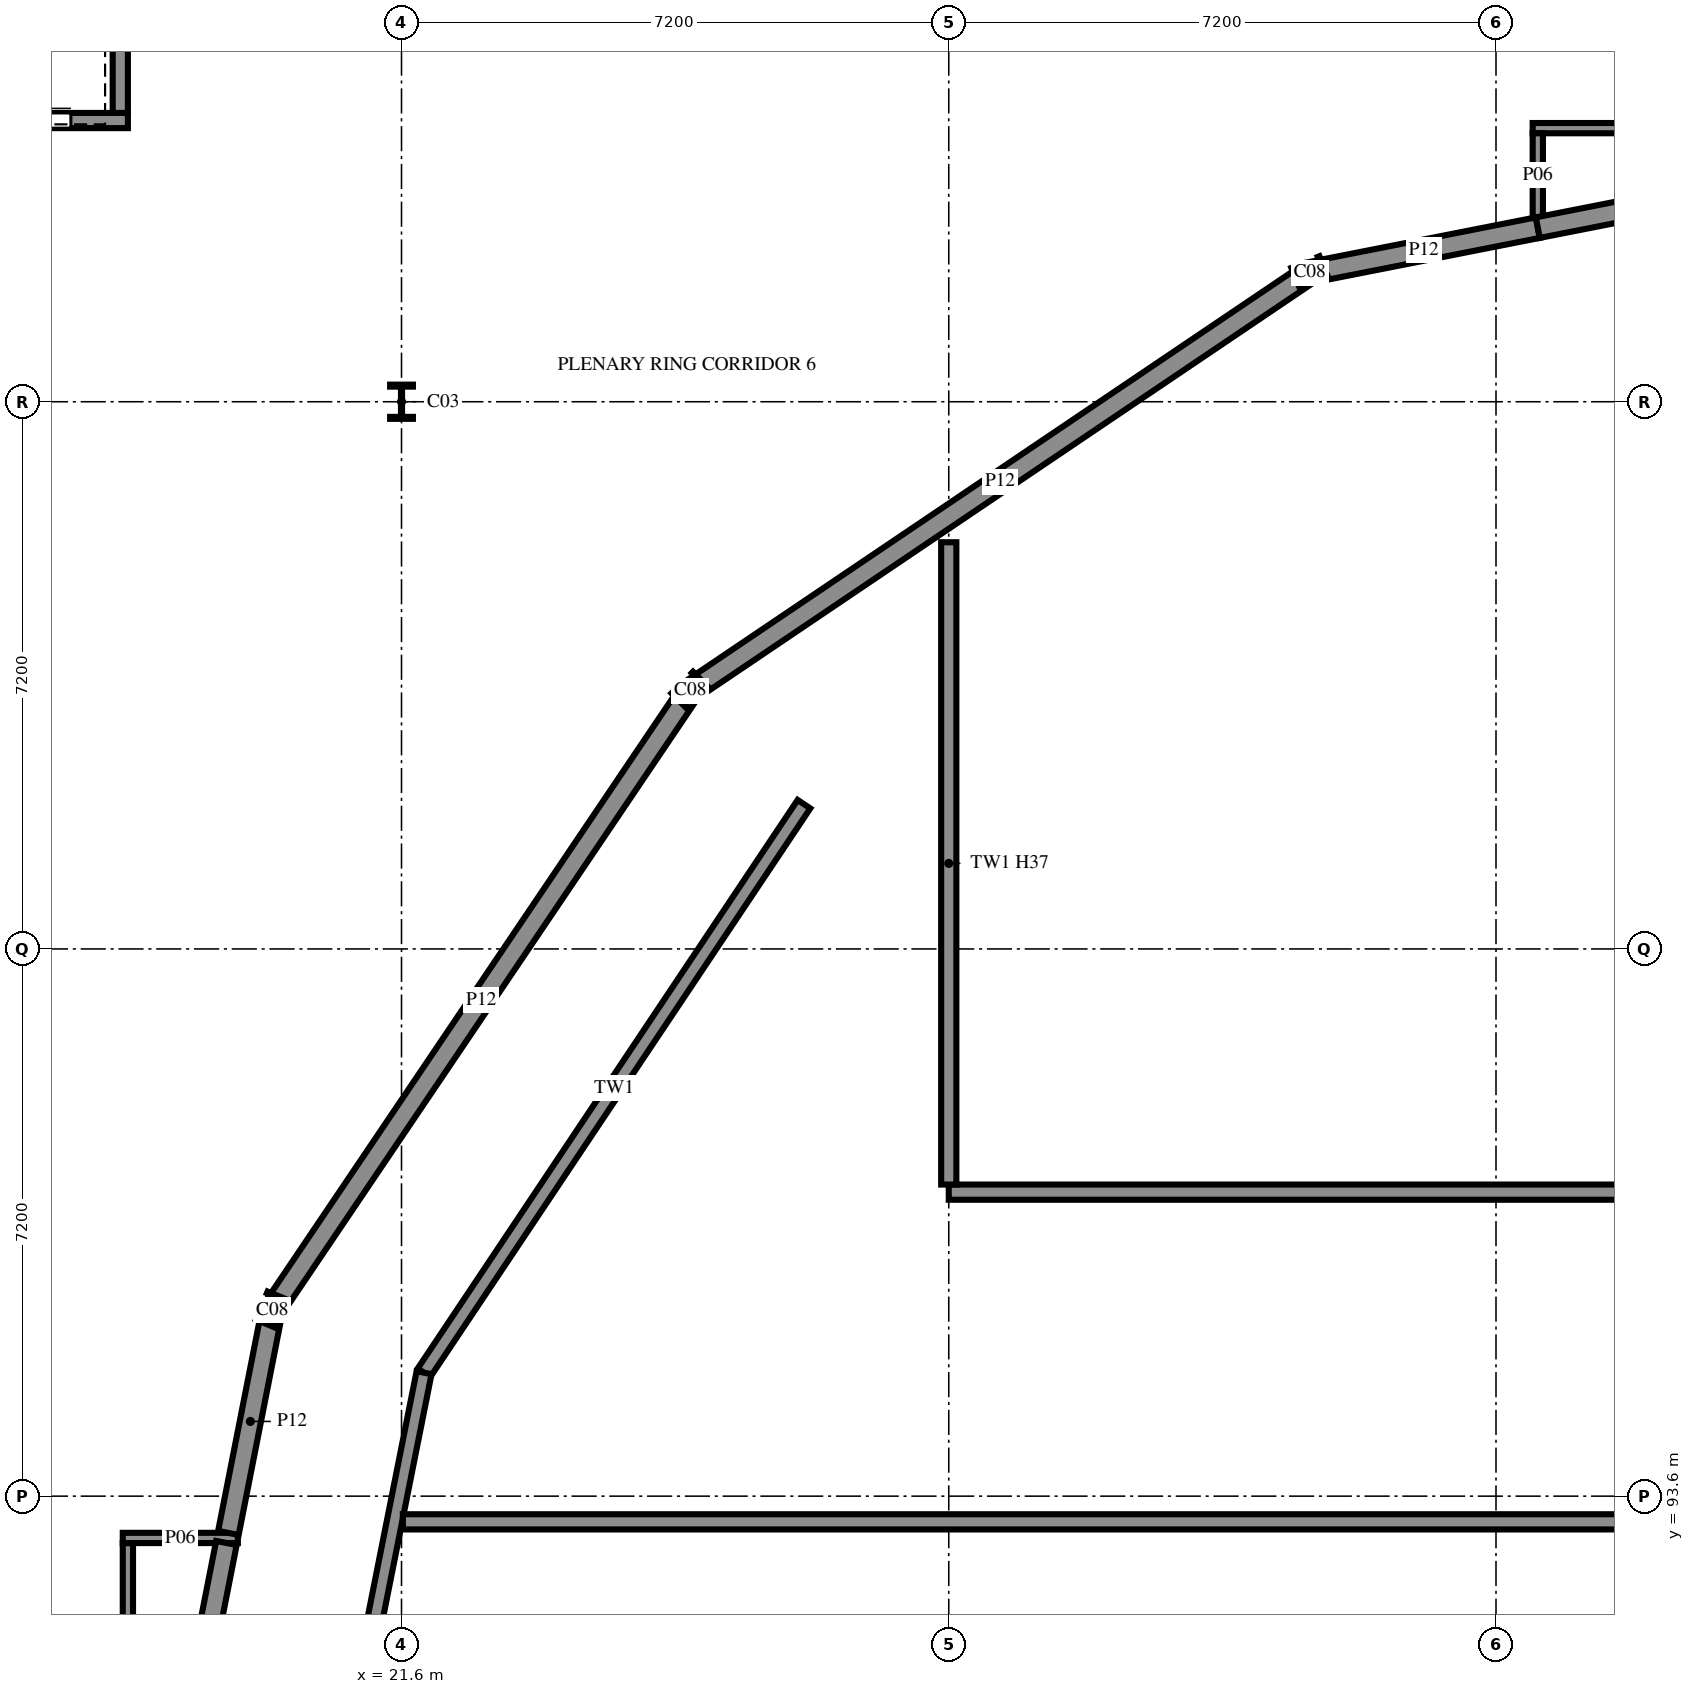
"""IFC4 building model, lengths in metres.
Left out: names, types, materials, properties, quantities, classifications, styles, units other than length and angle.
Written with IfcOpenShell. Run it as: python <this file> out.ifc"""

import sys

from ifc_helpers import new_model, si_unit, direction, frame, frame_2d, origin, origin_2d, place, context, subcontext, project, spatial, rectangle, i_section, extrude, element, fill, save


model = new_model("IFC4")
c1 = context("Model", 3, precision=1e-05, world=origin(), true_north=direction((0.0, 1.0)))
c2 = subcontext(c1, "Body", "Model", "MODEL_VIEW")
j1 = project(units=[si_unit("LENGTHUNIT", "METRE"), si_unit("PLANEANGLEUNIT", "RADIAN")], contexts=[c1])
p1 = place(None, origin())
s1 = spatial("IfcSite", under=j1, at=p1, CompositionType="ELEMENT")
p2 = place(p1, origin())
s2 = spatial("IfcBuilding", under=s1, at=p2, CompositionType="ELEMENT")
p3 = place(p2, frame((0.0, 0.0, 3.6)))
s3 = spatial("IfcBuildingStorey", under=s2, at=p3, CompositionType="ELEMENT", Elevation=3.6)
p4 = place(p3, frame((21.6, 108.0, 0.0), z_axis=(0.0, 0.0, 1.0), x_axis=(1.0, 0.0, 0.0)))
e1 = element("IfcColumn", 1, at=p4, inside=s3, PredefinedType="COLUMN", context=c2, shape_type="SweptSolid", body=[
    extrude(i_section(OverallWidth=0.3, OverallDepth=0.45, WebThickness=0.014, FlangeThickness=0.026, FilletRadius=0.027, at=origin_2d()), origin(), (0.0, 0.0, 1.0), 3.6),
])
for number, where, z_axis, x_axis in (
    (2, (33.55, 109.7, 0.0), (0.0, 0.0, 1.0), (-0.383, 0.924, 0.0)),
    (3, (25.4, 104.2, 0.0), (0.0, 0.0, 1.0), (-0.707, 0.707, 0.0)),
    (4, (19.9, 96.05, 0.0), (0.0, 0.0, 1.0), (-0.924, 0.383, 0.0)),
):
    element("IfcColumn", number, at=place(p3, frame(where, z_axis=z_axis, x_axis=x_axis)), inside=s3, PredefinedType="COLUMN", context=c2, shape_type="SweptSolid", body=[
        extrude(i_section(OverallWidth=0.3, OverallDepth=0.4, WebThickness=0.013, FlangeThickness=0.024, FilletRadius=0.027, at=origin_2d()), origin(), (0.0, 0.0, 1.0), 3.6),
    ])
p5 = place(p3, frame((15.4, 111.7, 0.0), z_axis=(0.0, 0.0, 1.0), x_axis=(1.0, 0.0, 0.0)))
e5 = element("IfcWall", 5, at=p5, inside=s3, PredefinedType="SHEAR", context=c2, shape_type="SweptSolid", body=[
    extrude(rectangle(XDim=2.6, YDim=0.2, at=frame_2d((1.3, 0.0))), origin(), (0.0, 0.0, 1.0), 3.6),
])
p6 = place(p5, frame((0.75, 0.0, 0.0)))
e6 = element("IfcOpeningElement", 6, at=p6, cuts=e5, PredefinedType="OPENING", context=c2, shape_type="SweptSolid", body=[
    extrude(rectangle(XDim=1.1, YDim=2.1, at=frame_2d((0.55, 1.05))), frame((0.0, 0.11, 0.0), z_axis=(0.0, -1.0, 0.0), x_axis=(1.0, 0.0, 0.0)), (0.0, 0.0, 1.0), 0.22),
])
p7 = place(p3, frame((17.9, 111.8, 0.0), z_axis=(0.0, 0.0, 1.0), x_axis=(0.0, 1.0, 0.0)))
e7 = element("IfcWall", 7, at=p7, inside=s3, PredefinedType="SHEAR", context=c2, shape_type="SweptSolid", body=[
    extrude(rectangle(XDim=2.2, YDim=0.2, at=frame_2d((1.1, 0.0))), origin(), (0.0, 0.0, 1.0), 3.6),
])
p8 = place(p3, frame((18.0, 92.982, 0.0), z_axis=(0.0, 0.0, 1.0), x_axis=(0.0, -1.0, 0.0)))
e8 = element("IfcWall", 8, at=p8, inside=s3, PredefinedType="PARTITIONING", context=c2, shape_type="SweptSolid", body=[
    extrude(rectangle(XDim=5.732, YDim=0.135, at=frame_2d((2.866, 0.0))), origin(), (0.0, 0.0, 1.0), 3.42),
])
p9 = place(p3, frame((42.35, 111.6, 0.0), z_axis=(0.0, 0.0, 1.0), x_axis=(-1.0, 0.0, 0.0)))
e9 = element("IfcWall", 9, at=p9, inside=s3, PredefinedType="PARTITIONING", context=c2, shape_type="SweptSolid", body=[
    extrude(rectangle(XDim=5.868, YDim=0.135, at=frame_2d((2.934, 0.0))), origin(), (0.0, 0.0, 1.0), 3.42),
])
p10 = place(p3, frame((36.55, 111.532, 0.0), z_axis=(0.0, 0.0, 1.0), x_axis=(0.0, -1.0, 0.0)))
e10 = element("IfcWall", 10, at=p10, inside=s3, PredefinedType="PARTITIONING", context=c2, shape_type="SweptSolid", body=[
    extrude(rectangle(XDim=1.104, YDim=0.135, at=frame_2d((0.552, 0.0))), origin(), (0.0, 0.0, 1.0), 3.42),
])
p11 = place(p3, frame((19.447, 93.05, 0.0), z_axis=(0.0, 0.0, 1.0), x_axis=(-1.0, 0.0, 0.0)))
e11 = element("IfcWall", 11, at=p11, inside=s3, PredefinedType="PARTITIONING", context=c2, shape_type="SweptSolid", body=[
    extrude(rectangle(XDim=1.514, YDim=0.135, at=frame_2d((0.757, 0.0))), origin(), (0.0, 0.0, 1.0), 3.42),
])
p12 = place(p3, frame((19.9, 96.05, 0.0), z_axis=(0.0, 0.0, 1.0), x_axis=(-0.193179069745, -0.98116351696, 0.0)))
e12 = element("IfcWall", 12, at=p12, inside=s3, PredefinedType="PARTITIONING", context=c2, shape_type="SweptSolid", body=[
    extrude(rectangle(XDim=2.99, YDim=0.275, at=frame_2d((1.495, 0.0))), origin(), (0.0, 0.0, 1.0), 3.07),
])
p13 = place(p3, frame((36.55, 110.291, 0.0), z_axis=(0.0, 0.0, 1.0), x_axis=(-0.981153778086, -0.19322852726, 0.0)))
e13 = element("IfcWall", 13, at=p13, inside=s3, PredefinedType="PARTITIONING", context=c2, shape_type="SweptSolid", body=[
    extrude(rectangle(XDim=3.058, YDim=0.275, at=frame_2d((1.529, 0.0))), origin(), (0.0, 0.0, 1.0), 3.07),
])
p14 = place(p3, frame((33.55, 109.7, 0.0), z_axis=(0.0, 0.0, 1.0), x_axis=(-0.828912285216, -0.559378604719, 0.0)))
e14 = element("IfcWall", 14, at=p14, inside=s3, PredefinedType="PARTITIONING", context=c2, shape_type="SweptSolid", body=[
    extrude(rectangle(XDim=9.832, YDim=0.275, at=frame_2d((4.916, 0.0))), origin(), (0.0, 0.0, 1.0), 3.07),
])
p15 = place(p3, frame((25.4, 104.2, 0.0), z_axis=(0.0, 0.0, 1.0), x_axis=(-0.559390118145, -0.828904515443, 0.0)))
e15 = element("IfcWall", 15, at=p15, inside=s3, PredefinedType="PARTITIONING", context=c2, shape_type="SweptSolid", body=[
    extrude(rectangle(XDim=9.832, YDim=0.275, at=frame_2d((4.916, 0.0))), origin(), (0.0, 0.0, 1.0), 3.07),
])
p16 = place(p3, frame((43.2, 111.6, 0.0), z_axis=(0.0, 0.0, 1.0), x_axis=(-0.981162344826, -0.193185022957, 0.0)))
e16 = element("IfcWall", 16, at=p16, inside=s3, PredefinedType="PARTITIONING", context=c2, shape_type="SweptSolid", body=[
    extrude(rectangle(XDim=6.778, YDim=0.275, at=frame_2d((3.389, 0.0))), origin(), (0.0, 0.0, 1.0), 3.07),
])
p17 = place(p3, frame((19.296, 92.984, 0.0), z_axis=(0.0, 0.0, 1.0), x_axis=(-0.193190675653, -0.981161231827, 0.0)))
e17 = element("IfcWall", 17, at=p17, inside=s3, PredefinedType="PARTITIONING", context=c2, shape_type="SweptSolid", body=[
    extrude(rectangle(XDim=6.71, YDim=0.275, at=frame_2d((3.355, 0.0))), origin(), (0.0, 0.0, 1.0), 3.07),
])
p18 = place(p3, frame((26.895, 102.705, 0.0), z_axis=(0.0, 0.0, 1.0), x_axis=(-0.555564045645, -0.83147374654, 0.0)))
e18 = element("IfcWall", 18, at=p18, inside=s3, PredefinedType="SOLIDWALL", context=c2, shape_type="SweptSolid", body=[
    extrude(rectangle(XDim=8.997, YDim=0.2, at=frame_2d((4.499, 0.0))), origin(), (0.0, 0.0, 1.0), 3.432),
])
p19 = place(p3, frame((21.896, 95.224, 0.0), z_axis=(0.0, 0.0, 1.0), x_axis=(-0.195103670716, -0.980782625087, 0.0)))
e19 = element("IfcWall", 19, at=p19, inside=s3, PredefinedType="SOLIDWALL", context=c2, shape_type="SweptSolid", body=[
    extrude(rectangle(XDim=8.997, YDim=0.2, at=frame_2d((4.499, 0.0))), origin(), (0.0, 0.0, 1.0), 3.432),
])
p20 = place(p3, frame((21.618, 93.262, 0.0), z_axis=(0.0, 0.0, 1.0), x_axis=(1.0, 0.0, 0.0)))
e20 = element("IfcWall", 20, at=p20, inside=s3, PredefinedType="SOLIDWALL", context=c2, shape_type="SweptSolid", body=[
    extrude(rectangle(XDim=43.165, YDim=0.2, at=frame_2d((21.582, 0.0))), origin(), (0.0, 0.0, 1.0), 0.438),
])
p21 = place(p3, frame((28.8, 97.6, 0.0), z_axis=(0.0, 0.0, 1.0), x_axis=(1.0, 0.0, 0.0)))
e21 = element("IfcWall", 21, at=p21, inside=s3, PredefinedType="SOLIDWALL", context=c2, shape_type="SweptSolid", body=[
    extrude(rectangle(XDim=28.8, YDim=0.2, at=frame_2d((14.4, 0.0))), origin(), (0.0, 0.0, 1.0), 0.552),
])
p22 = place(p3, frame((28.8, 97.7, 0.0), z_axis=(0.0, 0.0, 1.0), x_axis=(0.0, 1.0, 0.0)))
e22 = element("IfcWall", 22, at=p22, inside=s3, PredefinedType="SOLIDWALL", context=c2, shape_type="SweptSolid", body=[
    extrude(rectangle(XDim=8.451, YDim=0.2, at=frame_2d((4.226, 0.0))), origin(), (0.0, 0.0, 1.0), 0.552),
])
p23 = place(p6, origin())
e23 = element("IfcDoor", 23, at=p23, inside=s3, OperationType="SLIDING_TO_LEFT", PredefinedType="DOOR", context=c2, shape_type="SweptSolid", body=[
    extrude(rectangle(XDim=1.1, YDim=2.1, at=frame_2d((0.55, 1.05))), frame((0.0, 0.025, 0.0), z_axis=(0.0, -1.0, 0.0), x_axis=(1.0, 0.0, 0.0)), (0.0, 0.0, 1.0), 0.05),
])
fill(e6, e23)
save(model, sys.argv[1])
